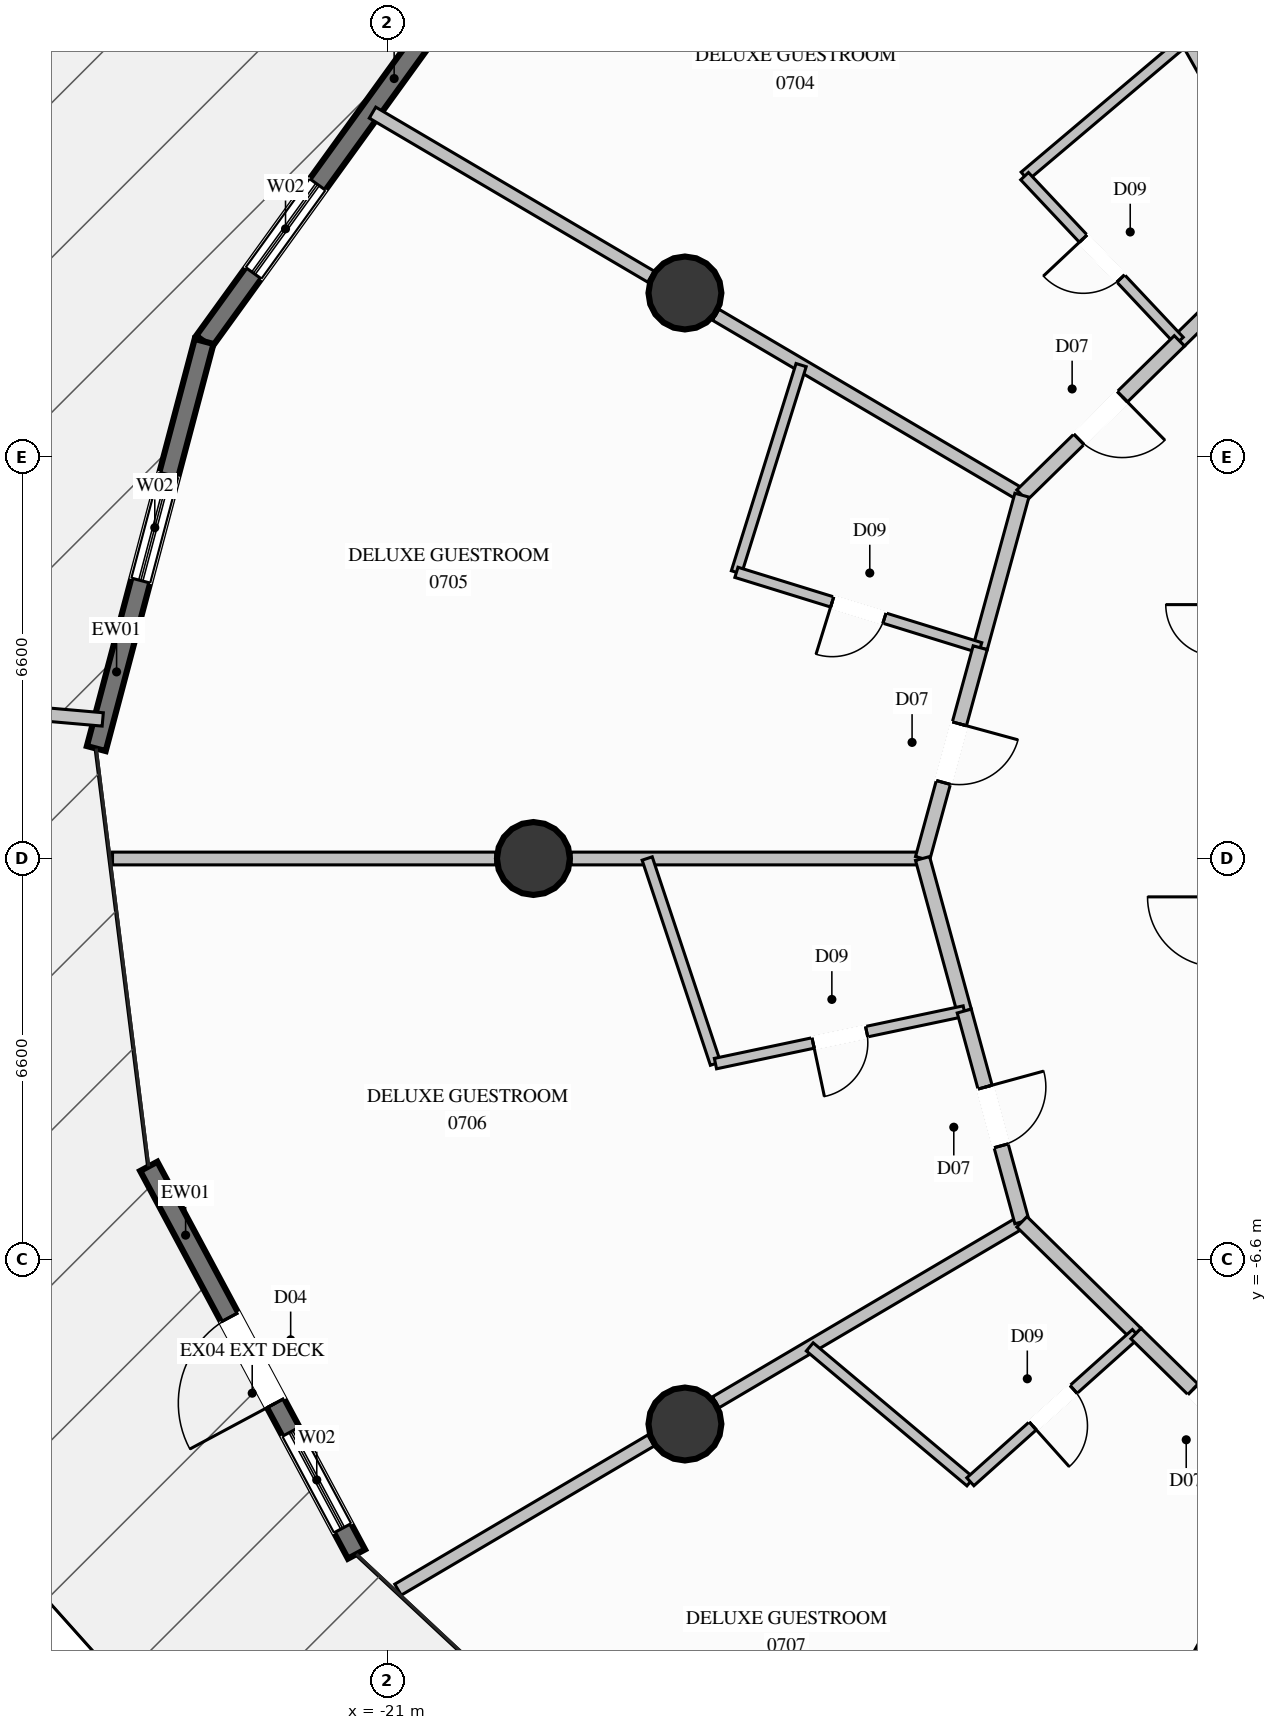
"""IFC4 building model, lengths in metres.
Left out: names, types, materials, properties, quantities, classifications, styles, units other than length and angle.
Written with IfcOpenShell. Run it as: python <this file> out.ifc"""

import sys

from ifc_helpers import new_model, si_unit, direction, frame, frame_2d, origin, origin_2d, place, context, subcontext, project, spatial, rectangle, circle, extrude, element, fill, save


model = new_model("IFC4")
c1 = context("Model", 3, precision=1e-05, world=origin(), true_north=direction((0.0, 1.0)))
c2 = subcontext(c1, "Body", "Model", "MODEL_VIEW")
j1 = project(units=[si_unit("LENGTHUNIT", "METRE"), si_unit("PLANEANGLEUNIT", "RADIAN")], contexts=[c1])
p1 = place(None, origin())
s1 = spatial("IfcSite", under=j1, at=p1, CompositionType="ELEMENT")
p2 = place(p1, origin())
s2 = spatial("IfcBuilding", under=s1, at=p2, CompositionType="ELEMENT")
p3 = place(p2, frame((0.0, 0.0, 28.4)))
s3 = spatial("IfcBuildingStorey", under=s2, at=p3, CompositionType="ELEMENT", Elevation=28.4)
for number, where, z_axis, x_axis in (
    (1, (-16.108, 9.3, 0.0), (0.0, 0.0, 1.0), (1.0, 0.0, 0.0)),
    (2, (-18.6, 0.0, 0.0), (0.0, 0.0, 1.0), (1.0, 0.0, 0.0)),
    (3, (-16.108, -9.3, 0.0), (0.0, 0.0, 1.0), (1.0, 0.0, 0.0)),
):
    element("IfcColumn", number, at=place(p3, frame(where, z_axis=z_axis, x_axis=x_axis)), inside=s3, PredefinedType="COLUMN", context=c2, shape_type="SweptSolid", body=[
        extrude(circle(Radius=0.6, at=origin_2d()), origin(), (0.0, 0.0, 1.0), 3.6),
    ])
p4 = place(p3, frame((-24.016, 8.503, 0.0), z_axis=(0.0, 0.0, 1.0), x_axis=(0.585883584877, 0.810395227634, 0.0)))
e4 = element("IfcWall", 4, at=p4, inside=s3, PredefinedType="SOLIDWALL", context=c2, shape_type="SweptSolid", body=[
    extrude(rectangle(XDim=7.234, YDim=0.32, at=frame_2d((3.617, 0.0))), origin(), (0.0, 0.0, 1.0), 3.34),
])
p5 = place(p4, frame((1.386, 0.0, 0.35)))
e5 = element("IfcOpeningElement", 5, at=p5, cuts=e4, PredefinedType="OPENING", context=c2, shape_type="SweptSolid", body=[
    extrude(rectangle(XDim=1.8, YDim=2.6, at=frame_2d((0.9, 1.3))), frame((0.0, 0.17, 0.0), z_axis=(0.0, -1.0, 0.0), x_axis=(1.0, 0.0, 0.0)), (0.0, 0.0, 1.0), 0.34),
])
p6 = place(p3, frame((-25.789, 1.808, 0.0), z_axis=(0.0, 0.0, 1.0), x_axis=(0.255999140835, 0.966677009084, 0.0)))
e6 = element("IfcWall", 6, at=p6, inside=s3, PredefinedType="SOLIDWALL", context=c2, shape_type="SweptSolid", body=[
    extrude(rectangle(XDim=6.926, YDim=0.32, at=frame_2d((3.463, 0.0))), origin(), (0.0, 0.0, 1.0), 3.34),
])
p7 = place(p6, frame((2.858, 0.0, 0.35)))
e7 = element("IfcOpeningElement", 7, at=p7, cuts=e6, PredefinedType="OPENING", context=c2, shape_type="SweptSolid", body=[
    extrude(rectangle(XDim=1.8, YDim=2.6, at=frame_2d((0.9, 1.3))), frame((0.0, 0.17, 0.0), z_axis=(0.0, -1.0, 0.0), x_axis=(1.0, 0.0, 0.0)), (0.0, 0.0, 1.0), 0.34),
])
p8 = place(p3, frame((-21.51, -11.439, 0.0), z_axis=(0.0, 0.0, 1.0), x_axis=(-0.472255130515, 0.881461905985, 0.0)))
e8 = element("IfcWall", 8, at=p8, inside=s3, PredefinedType="SOLIDWALL", context=c2, shape_type="SweptSolid", body=[
    extrude(rectangle(XDim=7.233, YDim=0.32, at=frame_2d((3.617, 0.0))), origin(), (0.0, 0.0, 1.0), 3.34),
])
p9 = place(p8, frame((0.483, 0.0, 0.35)))
e9 = element("IfcOpeningElement", 9, at=p9, cuts=e8, PredefinedType="OPENING", context=c2, shape_type="SweptSolid", body=[
    extrude(rectangle(XDim=1.8, YDim=2.6, at=frame_2d((0.9, 1.3))), frame((0.0, 0.17, 0.0), z_axis=(0.0, -1.0, 0.0), x_axis=(1.0, 0.0, 0.0)), (0.0, 0.0, 1.0), 0.34),
])
p10 = place(p8, frame((2.817, 0.0, 0.0)))
e10 = element("IfcOpeningElement", 10, at=p10, cuts=e8, PredefinedType="OPENING", context=c2, shape_type="SweptSolid", body=[
    extrude(rectangle(XDim=1.6, YDim=2.3, at=frame_2d((0.8, 1.15))), frame((0.0, 0.17, 0.0), z_axis=(0.0, -1.0, 0.0), x_axis=(1.0, 0.0, 0.0)), (0.0, 0.0, 1.0), 0.34),
])
p11 = place(p3, frame((-31.762, 2.819, 0.0), z_axis=(0.0, 0.0, 1.0), x_axis=(0.996192544857, -0.087180350827, 0.0)))
e11 = element("IfcWall", 11, at=p11, inside=s3, PredefinedType="PARAPET", context=c2, shape_type="SweptSolid", body=[
    extrude(rectangle(XDim=6.102, YDim=0.22, at=frame_2d((3.051, 0.0))), origin(), (0.0, 0.0, 1.0), 1.15),
])
p12 = place(p3, frame((-6.1, 10.349, 0.0), z_axis=(0.0, 0.0, 1.0), x_axis=(-0.491140594116, 0.871080315936, 0.0)))
e12 = element("IfcWall", 12, at=p12, inside=s3, PredefinedType="PARTITIONING", context=c2, shape_type="SweptSolid", body=[
    extrude(rectangle(XDim=5.969, YDim=0.21, at=frame_2d((2.985, 0.0))), origin(), (0.0, 0.0, 1.0), 2.708),
])
p13 = place(p3, frame((-10.566, 5.975, 0.0), z_axis=(0.0, 0.0, 1.0), x_axis=(-0.86160761681, 0.507574935014, 0.0)))
e13 = element("IfcWall", 13, at=p13, inside=s3, PredefinedType="PARTITIONING", context=c2, shape_type="SweptSolid", body=[
    extrude(rectangle(XDim=5.845, YDim=0.21, at=frame_2d((2.922, 0.0))), origin(), (0.0, 0.0, 1.0), 2.708),
])
p14 = place(p3, frame((-16.667, 9.569, 0.0), z_axis=(0.0, 0.0, 1.0), x_axis=(-0.861651827739, 0.50749987956, 0.0)))
e14 = element("IfcWall", 14, at=p14, inside=s3, PredefinedType="PARTITIONING", context=c2, shape_type="SweptSolid", body=[
    extrude(rectangle(XDim=5.314, YDim=0.21, at=frame_2d((2.657, 0.0))), origin(), (0.0, 0.0, 1.0), 3.34),
])
p15 = place(p3, frame((-12.2, 0.0, 0.0), z_axis=(0.0, 0.0, 1.0), x_axis=(-1.0, 0.0, 0.0)))
e15 = element("IfcWall", 15, at=p15, inside=s3, PredefinedType="PARTITIONING", context=c2, shape_type="SweptSolid", body=[
    extrude(rectangle(XDim=5.78, YDim=0.21, at=frame_2d((2.89, 0.0))), origin(), (0.0, 0.0, 1.0), 2.708),
])
p16 = place(p3, frame((-19.22, 0.0, 0.0), z_axis=(0.0, 0.0, 1.0), x_axis=(-1.0, 0.0, 0.0)))
e16 = element("IfcWall", 16, at=p16, inside=s3, PredefinedType="PARTITIONING", context=c2, shape_type="SweptSolid", body=[
    extrude(rectangle(XDim=6.302, YDim=0.21, at=frame_2d((3.151, 0.0))), origin(), (0.0, 0.0, 1.0), 3.34),
])
p17 = place(p3, frame((-10.566, -5.975, 0.0), z_axis=(0.0, 0.0, 1.0), x_axis=(-0.861473203585, -0.507803032194, 0.0)))
e17 = element("IfcWall", 17, at=p17, inside=s3, PredefinedType="PARTITIONING", context=c2, shape_type="SweptSolid", body=[
    extrude(rectangle(XDim=5.845, YDim=0.21, at=frame_2d((2.922, 0.0))), origin(), (0.0, 0.0, 1.0), 2.708),
])
p18 = place(p3, frame((-16.666, -9.571, 0.0), z_axis=(0.0, 0.0, 1.0), x_axis=(-0.861454358035, -0.50783500177, 0.0)))
e18 = element("IfcWall", 18, at=p18, inside=s3, PredefinedType="PARTITIONING", context=c2, shape_type="SweptSolid", body=[
    extrude(rectangle(XDim=4.83, YDim=0.21, at=frame_2d((2.415, 0.0))), origin(), (0.0, 0.0, 1.0), 3.34),
])
p19 = place(p3, frame((-6.1, -10.349, 0.0), z_axis=(0.0, 0.0, 1.0), x_axis=(-0.490503945764, -0.871438970433, 0.0)))
e19 = element("IfcWall", 19, at=p19, inside=s3, PredefinedType="PARTITIONING", context=c2, shape_type="SweptSolid", body=[
    extrude(rectangle(XDim=5.969, YDim=0.21, at=frame_2d((2.985, 0.0))), origin(), (0.0, 0.0, 1.0), 2.708),
])
p20 = place(p3, frame((-6.1, 10.349, 0.0), z_axis=(0.0, 0.0, 1.0), x_axis=(-0.714460071513, -0.69967621527, 0.0)))
e20 = element("IfcWall", 20, at=p20, inside=s3, PredefinedType="PARTITIONING", context=c2, shape_type="SweptSolid", body=[
    extrude(rectangle(XDim=2.626, YDim=0.24, at=frame_2d((1.313, 0.0))), origin(), (0.0, 0.0, 1.0), 3.34),
])
p21 = place(p3, frame((-7.86, 13.471, 0.0), z_axis=(0.0, 0.0, 1.0), x_axis=(-0.763718302061, -0.645549653471, 0.0)))
e21 = element("IfcWall", 21, at=p21, inside=s3, PredefinedType="PLUMBINGWALL", context=c2, shape_type="SweptSolid", body=[
    extrude(rectangle(XDim=3.485, YDim=0.175, at=frame_2d((1.743, 0.0))), origin(), (0.0, 0.0, 1.0), 3.34),
])
p22 = place(p3, frame((-7.976, 8.512, 0.0), z_axis=(0.0, 0.0, 1.0), x_axis=(-0.684831906404, 0.72870107724, 0.0)))
e22 = element("IfcWall", 22, at=p22, inside=s3, PredefinedType="PLUMBINGWALL", context=c2, shape_type="SweptSolid", body=[
    extrude(rectangle(XDim=3.718, YDim=0.175, at=frame_2d((1.859, 0.0))), origin(), (0.0, 0.0, 1.0), 3.34),
])
p23 = place(p22, frame((1.409, 0.0, 0.0)))
e23 = element("IfcOpeningElement", 23, at=p23, cuts=e22, PredefinedType="OPENING", context=c2, shape_type="SweptSolid", body=[
    extrude(rectangle(XDim=0.9, YDim=2.1, at=frame_2d((0.45, 1.05))), frame((0.0, 0.098, 0.0), z_axis=(0.0, -1.0, 0.0), x_axis=(1.0, 0.0, 0.0)), (0.0, 0.0, 1.0), 0.195),
])
p24 = place(p3, frame((-7.976, 8.512, 0.0), z_axis=(0.0, 0.0, 1.0), x_axis=(-0.714375756875, -0.699762301064, 0.0)))
e24 = element("IfcWall", 24, at=p24, inside=s3, PredefinedType="PARTITIONING", context=c2, shape_type="SweptSolid", body=[
    extrude(rectangle(XDim=3.625, YDim=0.24, at=frame_2d((1.812, 0.0))), origin(), (0.0, 0.0, 1.0), 3.34),
])
p25 = place(p24, frame((1.313, 0.0, 0.0)))
e25 = element("IfcOpeningElement", 25, at=p25, cuts=e24, PredefinedType="OPENING", context=c2, shape_type="SweptSolid", body=[
    extrude(rectangle(XDim=1.0, YDim=2.2, at=frame_2d((0.5, 1.1))), frame((0.0, 0.13, 0.0), z_axis=(0.0, -1.0, 0.0), x_axis=(1.0, 0.0, 0.0)), (0.0, 0.0, 1.0), 0.26),
])
p26 = place(p3, frame((-10.566, 5.975, 0.0), z_axis=(0.0, 0.0, 1.0), x_axis=(-0.263744763784, -0.964592504416, 0.0)))
e26 = element("IfcWall", 26, at=p26, inside=s3, PredefinedType="PARTITIONING", context=c2, shape_type="SweptSolid", body=[
    extrude(rectangle(XDim=2.601, YDim=0.24, at=frame_2d((1.301, 0.0))), origin(), (0.0, 0.0, 1.0), 3.34),
])
p27 = place(p3, frame((-14.197, 8.114, 0.0), z_axis=(0.0, 0.0, 1.0), x_axis=(-0.298014103634, -0.954561466871, 0.0)))
e27 = element("IfcWall", 27, at=p27, inside=s3, PredefinedType="PLUMBINGWALL", context=c2, shape_type="SweptSolid", body=[
    extrude(rectangle(XDim=3.57, YDim=0.175, at=frame_2d((1.785, 0.0))), origin(), (0.0, 0.0, 1.0), 3.34),
])
p28 = place(p3, frame((-11.252, 3.466, 0.0), z_axis=(0.0, 0.0, 1.0), x_axis=(-0.955346516927, 0.295487787557, 0.0)))
e28 = element("IfcWall", 28, at=p28, inside=s3, PredefinedType="PLUMBINGWALL", context=c2, shape_type="SweptSolid", body=[
    extrude(rectangle(XDim=4.197, YDim=0.175, at=frame_2d((2.098, 0.0))), origin(), (0.0, 0.0, 1.0), 3.34),
])
p29 = place(p28, frame((1.648, 0.0, 0.0)))
e29 = element("IfcOpeningElement", 29, at=p29, cuts=e28, PredefinedType="OPENING", context=c2, shape_type="SweptSolid", body=[
    extrude(rectangle(XDim=0.9, YDim=2.1, at=frame_2d((0.45, 1.05))), frame((0.0, 0.098, 0.0), z_axis=(0.0, -1.0, 0.0), x_axis=(1.0, 0.0, 0.0)), (0.0, 0.0, 1.0), 0.195),
])
p30 = place(p3, frame((-11.252, 3.466, 0.0), z_axis=(0.0, 0.0, 1.0), x_axis=(-0.263818706543, -0.96457228349, 0.0)))
e30 = element("IfcWall", 30, at=p30, inside=s3, PredefinedType="PARTITIONING", context=c2, shape_type="SweptSolid", body=[
    extrude(rectangle(XDim=3.593, YDim=0.24, at=frame_2d((1.797, 0.0))), origin(), (0.0, 0.0, 1.0), 3.34),
])
p31 = place(p30, frame((1.297, 0.0, 0.0)))
e31 = element("IfcOpeningElement", 31, at=p31, cuts=e30, PredefinedType="OPENING", context=c2, shape_type="SweptSolid", body=[
    extrude(rectangle(XDim=1.0, YDim=2.2, at=frame_2d((0.5, 1.1))), frame((0.0, 0.13, 0.0), z_axis=(0.0, -1.0, 0.0), x_axis=(1.0, 0.0, 0.0)), (0.0, 0.0, 1.0), 0.26),
])
p32 = place(p3, frame((-12.2, 0.0, 0.0), z_axis=(0.0, 0.0, 1.0), x_axis=(0.263744763784, -0.964592504416, 0.0)))
e32 = element("IfcWall", 32, at=p32, inside=s3, PredefinedType="PARTITIONING", context=c2, shape_type="SweptSolid", body=[
    extrude(rectangle(XDim=2.601, YDim=0.24, at=frame_2d((1.301, 0.0))), origin(), (0.0, 0.0, 1.0), 3.34),
])
p33 = place(p3, frame((-16.729, 0.0, 0.0), z_axis=(0.0, 0.0, 1.0), x_axis=(0.315898114113, -0.948793118388, 0.0)))
e33 = element("IfcWall", 33, at=p33, inside=s3, PredefinedType="PLUMBINGWALL", context=c2, shape_type="SweptSolid", body=[
    extrude(rectangle(XDim=3.555, YDim=0.175, at=frame_2d((1.778, 0.0))), origin(), (0.0, 0.0, 1.0), 3.34),
])
p34 = place(p3, frame((-11.514, -2.509, 0.0), z_axis=(0.0, 0.0, 1.0), x_axis=(-0.978427598238, -0.206590016715, 0.0)))
e34 = element("IfcWall", 34, at=p34, inside=s3, PredefinedType="PLUMBINGWALL", context=c2, shape_type="SweptSolid", body=[
    extrude(rectangle(XDim=4.182, YDim=0.175, at=frame_2d((2.091, 0.0))), origin(), (0.0, 0.0, 1.0), 3.34),
])
p35 = place(p34, frame((1.641, 0.0, 0.0)))
e35 = element("IfcOpeningElement", 35, at=p35, cuts=e34, PredefinedType="OPENING", context=c2, shape_type="SweptSolid", body=[
    extrude(rectangle(XDim=0.9, YDim=2.1, at=frame_2d((0.45, 1.05))), frame((0.0, 0.098, 0.0), z_axis=(0.0, -1.0, 0.0), x_axis=(1.0, 0.0, 0.0)), (0.0, 0.0, 1.0), 0.195),
])
p36 = place(p3, frame((-11.514, -2.509, 0.0), z_axis=(0.0, 0.0, 1.0), x_axis=(0.263818706543, -0.96457228349, 0.0)))
e36 = element("IfcWall", 36, at=p36, inside=s3, PredefinedType="PARTITIONING", context=c2, shape_type="SweptSolid", body=[
    extrude(rectangle(XDim=3.593, YDim=0.24, at=frame_2d((1.797, 0.0))), origin(), (0.0, 0.0, 1.0), 3.34),
])
p37 = place(p36, frame((1.297, 0.0, 0.0)))
e37 = element("IfcOpeningElement", 37, at=p37, cuts=e36, PredefinedType="OPENING", context=c2, shape_type="SweptSolid", body=[
    extrude(rectangle(XDim=1.0, YDim=2.2, at=frame_2d((0.5, 1.1))), frame((0.0, 0.13, 0.0), z_axis=(0.0, -1.0, 0.0), x_axis=(1.0, 0.0, 0.0)), (0.0, 0.0, 1.0), 0.26),
])
p38 = place(p3, frame((-10.566, -5.975, 0.0), z_axis=(0.0, 0.0, 1.0), x_axis=(0.714506552913, -0.699628748584, 0.0)))
e38 = element("IfcWall", 38, at=p38, inside=s3, PredefinedType="PARTITIONING", context=c2, shape_type="SweptSolid", body=[
    extrude(rectangle(XDim=2.625, YDim=0.24, at=frame_2d((1.313, 0.0))), origin(), (0.0, 0.0, 1.0), 3.34),
])
p39 = place(p3, frame((-14.055, -8.032, 0.0), z_axis=(0.0, 0.0, 1.0), x_axis=(0.765749489357, -0.643138958196, 0.0)))
e39 = element("IfcWall", 39, at=p39, inside=s3, PredefinedType="PLUMBINGWALL", context=c2, shape_type="SweptSolid", body=[
    extrude(rectangle(XDim=3.449, YDim=0.175, at=frame_2d((1.724, 0.0))), origin(), (0.0, 0.0, 1.0), 3.34),
])
p40 = place(p3, frame((-8.69, -7.812, 0.0), z_axis=(0.0, 0.0, 1.0), x_axis=(-0.745157470099, -0.666888554975, 0.0)))
e40 = element("IfcWall", 40, at=p40, inside=s3, PredefinedType="PLUMBINGWALL", context=c2, shape_type="SweptSolid", body=[
    extrude(rectangle(XDim=3.656, YDim=0.175, at=frame_2d((1.828, 0.0))), origin(), (0.0, 0.0, 1.0), 3.34),
])
p41 = place(p40, frame((1.378, 0.0, 0.0)))
e41 = element("IfcOpeningElement", 41, at=p41, cuts=e40, PredefinedType="OPENING", context=c2, shape_type="SweptSolid", body=[
    extrude(rectangle(XDim=0.9, YDim=2.1, at=frame_2d((0.45, 1.05))), frame((0.0, 0.098, 0.0), z_axis=(0.0, -1.0, 0.0), x_axis=(1.0, 0.0, 0.0)), (0.0, 0.0, 1.0), 0.195),
])
p42 = place(p3, frame((-8.69, -7.812, 0.0), z_axis=(0.0, 0.0, 1.0), x_axis=(0.714342093268, -0.699796666029, 0.0)))
e42 = element("IfcWall", 42, at=p42, inside=s3, PredefinedType="PARTITIONING", context=c2, shape_type="SweptSolid", body=[
    extrude(rectangle(XDim=3.625, YDim=0.24, at=frame_2d((1.813, 0.0))), origin(), (0.0, 0.0, 1.0), 3.34),
])
p43 = place(p42, frame((1.313, 0.0, 0.0)))
e43 = element("IfcOpeningElement", 43, at=p43, cuts=e42, PredefinedType="OPENING", context=c2, shape_type="SweptSolid", body=[
    extrude(rectangle(XDim=1.0, YDim=2.2, at=frame_2d((0.5, 1.1))), frame((0.0, 0.13, 0.0), z_axis=(0.0, -1.0, 0.0), x_axis=(1.0, 0.0, 0.0)), (0.0, 0.0, 1.0), 0.26),
])
p44 = place(p5, origin())
e44 = element("IfcWindow", 44, at=p44, inside=s3, PartitioningType="SINGLE_PANEL", PredefinedType="WINDOW", context=c2, shape_type="SweptSolid", body=[
    extrude(rectangle(XDim=1.8, YDim=2.6, at=frame_2d((0.9, 1.3))), frame((0.0, 0.03, 0.0), z_axis=(0.0, -1.0, 0.0), x_axis=(1.0, 0.0, 0.0)), (0.0, 0.0, 1.0), 0.06),
])
fill(e5, e44)
p45 = place(p7, origin())
e45 = element("IfcWindow", 45, at=p45, inside=s3, PartitioningType="SINGLE_PANEL", PredefinedType="WINDOW", context=c2, shape_type="SweptSolid", body=[
    extrude(rectangle(XDim=1.8, YDim=2.6, at=frame_2d((0.9, 1.3))), frame((0.0, 0.03, 0.0), z_axis=(0.0, -1.0, 0.0), x_axis=(1.0, 0.0, 0.0)), (0.0, 0.0, 1.0), 0.06),
])
fill(e7, e45)
p46 = place(p9, origin())
e46 = element("IfcWindow", 46, at=p46, inside=s3, PartitioningType="SINGLE_PANEL", PredefinedType="WINDOW", context=c2, shape_type="SweptSolid", body=[
    extrude(rectangle(XDim=1.8, YDim=2.6, at=frame_2d((0.9, 1.3))), frame((0.0, 0.03, 0.0), z_axis=(0.0, -1.0, 0.0), x_axis=(1.0, 0.0, 0.0)), (0.0, 0.0, 1.0), 0.06),
])
fill(e9, e46)
p47 = place(p10, origin())
e47 = element("IfcDoor", 47, at=p47, inside=s3, OperationType="SINGLE_SWING_LEFT", PredefinedType="DOOR", context=c2, shape_type="SweptSolid", body=[
    extrude(rectangle(XDim=1.6, YDim=2.3, at=frame_2d((0.8, 1.15))), frame((0.0, 0.025, 0.0), z_axis=(0.0, -1.0, 0.0), x_axis=(1.0, 0.0, 0.0)), (0.0, 0.0, 1.0), 0.05),
])
fill(e10, e47)
p48 = place(p23, origin())
e48 = element("IfcDoor", 48, at=p48, inside=s3, OperationType="SINGLE_SWING_RIGHT", PredefinedType="DOOR", context=c2, shape_type="SweptSolid", body=[
    extrude(rectangle(XDim=0.9, YDim=2.1, at=frame_2d((0.45, 1.05))), frame((0.0, 0.025, 0.0), z_axis=(0.0, -1.0, 0.0), x_axis=(1.0, 0.0, 0.0)), (0.0, 0.0, 1.0), 0.05),
])
fill(e23, e48)
p49 = place(p25, origin())
e49 = element("IfcDoor", 49, at=p49, inside=s3, OperationType="SINGLE_SWING_LEFT", PredefinedType="DOOR", context=c2, shape_type="SweptSolid", body=[
    extrude(rectangle(XDim=1.0, YDim=2.2, at=frame_2d((0.5, 1.1))), frame((0.0, 0.025, 0.0), z_axis=(0.0, -1.0, 0.0), x_axis=(1.0, 0.0, 0.0)), (0.0, 0.0, 1.0), 0.05),
])
fill(e25, e49)
p50 = place(p29, origin())
e50 = element("IfcDoor", 50, at=p50, inside=s3, OperationType="SINGLE_SWING_RIGHT", PredefinedType="DOOR", context=c2, shape_type="SweptSolid", body=[
    extrude(rectangle(XDim=0.9, YDim=2.1, at=frame_2d((0.45, 1.05))), frame((0.0, 0.025, 0.0), z_axis=(0.0, -1.0, 0.0), x_axis=(1.0, 0.0, 0.0)), (0.0, 0.0, 1.0), 0.05),
])
fill(e29, e50)
p51 = place(p31, origin())
e51 = element("IfcDoor", 51, at=p51, inside=s3, OperationType="SINGLE_SWING_LEFT", PredefinedType="DOOR", context=c2, shape_type="SweptSolid", body=[
    extrude(rectangle(XDim=1.0, YDim=2.2, at=frame_2d((0.5, 1.1))), frame((0.0, 0.025, 0.0), z_axis=(0.0, -1.0, 0.0), x_axis=(1.0, 0.0, 0.0)), (0.0, 0.0, 1.0), 0.05),
])
fill(e31, e51)
p52 = place(p35, origin())
e52 = element("IfcDoor", 52, at=p52, inside=s3, OperationType="SINGLE_SWING_RIGHT", PredefinedType="DOOR", context=c2, shape_type="SweptSolid", body=[
    extrude(rectangle(XDim=0.9, YDim=2.1, at=frame_2d((0.45, 1.05))), frame((0.0, 0.025, 0.0), z_axis=(0.0, -1.0, 0.0), x_axis=(1.0, 0.0, 0.0)), (0.0, 0.0, 1.0), 0.05),
])
fill(e35, e52)
p53 = place(p37, origin())
e53 = element("IfcDoor", 53, at=p53, inside=s3, OperationType="SINGLE_SWING_LEFT", PredefinedType="DOOR", context=c2, shape_type="SweptSolid", body=[
    extrude(rectangle(XDim=1.0, YDim=2.2, at=frame_2d((0.5, 1.1))), frame((0.0, 0.025, 0.0), z_axis=(0.0, -1.0, 0.0), x_axis=(1.0, 0.0, 0.0)), (0.0, 0.0, 1.0), 0.05),
])
fill(e37, e53)
p54 = place(p41, origin())
e54 = element("IfcDoor", 54, at=p54, inside=s3, OperationType="SINGLE_SWING_RIGHT", PredefinedType="DOOR", context=c2, shape_type="SweptSolid", body=[
    extrude(rectangle(XDim=0.9, YDim=2.1, at=frame_2d((0.45, 1.05))), frame((0.0, 0.025, 0.0), z_axis=(0.0, -1.0, 0.0), x_axis=(1.0, 0.0, 0.0)), (0.0, 0.0, 1.0), 0.05),
])
fill(e41, e54)
p55 = place(p43, origin())
e55 = element("IfcDoor", 55, at=p55, inside=s3, OperationType="SINGLE_SWING_LEFT", PredefinedType="DOOR", context=c2, shape_type="SweptSolid", body=[
    extrude(rectangle(XDim=1.0, YDim=2.2, at=frame_2d((0.5, 1.1))), frame((0.0, 0.025, 0.0), z_axis=(0.0, -1.0, 0.0), x_axis=(1.0, 0.0, 0.0)), (0.0, 0.0, 1.0), 0.05),
])
fill(e43, e55)
save(model, sys.argv[1])
